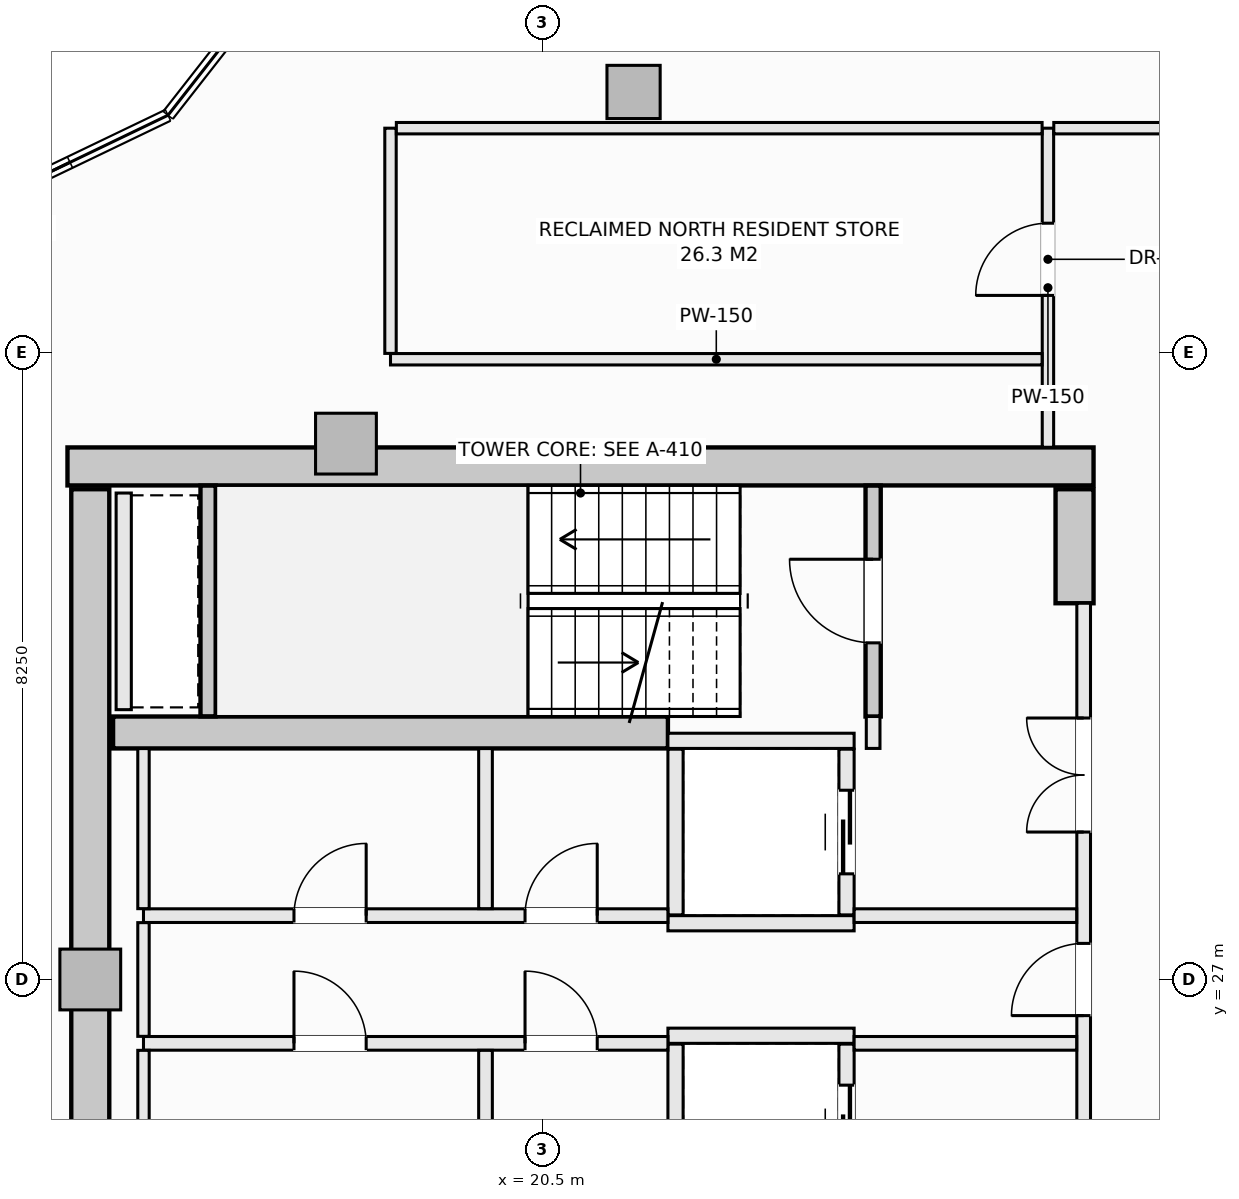
"""IFC4 building model, lengths in metres.
Left out: names, types, materials, properties, quantities, classifications, styles, units other than length and angle.
Written with IfcOpenShell. Run it as: python <this file> out.ifc"""

import sys

from ifc_helpers import new_model, si_unit, direction, frame, frame_2d, origin, origin_2d, place, context, subcontext, project, spatial, rectangle, extrude, element, fill, save


model = new_model("IFC4")
c1 = context("Model", 3, precision=1e-05, world=origin(), true_north=direction((0.0, 1.0)))
c2 = subcontext(c1, "Body", "Model", "MODEL_VIEW")
j1 = project(units=[si_unit("LENGTHUNIT", "METRE"), si_unit("PLANEANGLEUNIT", "RADIAN")], contexts=[c1])
p1 = place(None, origin())
s1 = spatial("IfcSite", under=j1, at=p1, CompositionType="ELEMENT")
p2 = place(p1, origin())
s2 = spatial("IfcBuilding", under=s1, at=p2, CompositionType="ELEMENT")
p3 = place(p2, frame((0.0, 0.0, 252.5)))
s3 = spatial("IfcBuildingStorey", under=s2, at=p3, CompositionType="ELEMENT", Elevation=252.5)
p4 = place(p3, frame((14.25, 33.75, -0.27), z_axis=(0.0, 0.0, 1.0), x_axis=(1.0, 0.0, 0.0)))
e1 = element("IfcWall", 1, at=p4, inside=s3, PredefinedType="SHEAR", context=c2, shape_type="SweptSolid", body=[
    extrude(rectangle(XDim=13.5, YDim=0.5, at=frame_2d((6.75, 0.0))), origin(), (0.0, 0.0, 1.0), 3.3),
])
p5 = place(p3, frame((14.55, 20.55, -0.27), z_axis=(0.0, 0.0, 1.0), x_axis=(0.0, 1.0, 0.0)))
e2 = element("IfcWall", 2, at=p5, inside=s3, PredefinedType="SHEAR", context=c2, shape_type="SweptSolid", body=[
    extrude(rectangle(XDim=12.9, YDim=0.5, at=frame_2d((6.45, 0.0))), origin(), (0.0, 0.0, 1.0), 3.3),
])
p6 = place(p3, frame((27.5, 31.95, -0.27), z_axis=(0.0, 0.0, 1.0), x_axis=(0.0, 1.0, 0.0)))
e3 = element("IfcWall", 3, at=p6, inside=s3, PredefinedType="SHEAR", context=c2, shape_type="SweptSolid", body=[
    extrude(rectangle(XDim=1.5, YDim=0.5, at=frame_2d((0.75, 0.0))), origin(), (0.0, 0.0, 1.0), 3.3),
])
p7 = place(p3, frame((14.85, 30.25, -0.27), z_axis=(0.0, 0.0, 1.0), x_axis=(1.0, 0.0, 0.0)))
e4 = element("IfcWall", 4, at=p7, inside=s3, PredefinedType="SHEAR", context=c2, shape_type="SweptSolid", body=[
    extrude(rectangle(XDim=7.3, YDim=0.42, at=frame_2d((3.65, 0.0))), origin(), (0.0, 0.0, 1.0), 3.3),
])
p8 = place(p3, frame((21.698, 38.677, -0.27), z_axis=(0.0, 0.0, 1.0), x_axis=(1.0, 0.0, 0.0)))
e5 = element("IfcColumn", 5, at=p8, inside=s3, PredefinedType="COLUMN", context=c2, shape_type="SweptSolid", body=[
    extrude(rectangle(XDim=0.7, YDim=0.7, at=origin_2d()), origin(), (0.0, 0.0, 1.0), 3.3),
])
for number, where, z_axis, x_axis in (
    (6, (17.914, 34.05, -0.27), (0.0, 0.0, 1.0), (1.0, 0.0, 0.0)),
    (7, (14.55, 27.0, -0.27), (0.0, 0.0, 1.0), (1.0, 0.0, 0.0)),
):
    element("IfcColumn", number, at=place(p3, frame(where, z_axis=z_axis, x_axis=x_axis)), inside=s3, PredefinedType="PILASTER", context=c2, shape_type="SweptSolid", body=[
        extrude(rectangle(XDim=0.8, YDim=0.8, at=origin_2d()), origin(), (0.0, 0.0, 1.0), 3.3),
    ])
p9 = place(p3, frame((24.85, 30.46, -0.27), z_axis=(0.0, 0.0, 1.0), x_axis=(0.0, 1.0, 0.0)))
e8 = element("IfcWall", 8, at=p9, inside=s3, PredefinedType="SHEAR", context=c2, shape_type="SweptSolid", body=[
    extrude(rectangle(XDim=3.038, YDim=0.2, at=frame_2d((1.519, 0.0))), origin(), (0.0, 0.0, 1.0), 3.3),
])
p10 = place(p9, frame((0.969, 0.0, 0.27)))
e9 = element("IfcOpeningElement", 9, at=p10, cuts=e8, PredefinedType="OPENING", context=c2, shape_type="SweptSolid", body=[
    extrude(rectangle(XDim=1.1, YDim=2.15, at=frame_2d((0.55, 1.075))), frame((0.0, 0.11, 0.0), z_axis=(0.0, -1.0, 0.0), x_axis=(1.0, 0.0, 0.0)), (0.0, 0.0, 1.0), 0.22),
])
p11 = place(p3, frame((16.1, 30.462, -0.27), z_axis=(0.0, 0.0, 1.0), x_axis=(0.0, 1.0, 0.0)))
e10 = element("IfcWall", 10, at=p11, inside=s3, PredefinedType="SHEAR", context=c2, shape_type="SweptSolid", body=[
    extrude(rectangle(XDim=3.036, YDim=0.2, at=frame_2d((1.518, 0.0))), origin(), (0.0, 0.0, 1.0), 3.3),
])
for number, where, z_axis, x_axis in (
    (11, (22.15, 30.14, 0.0), (0.0, 0.0, 1.0), (1.0, 0.0, 0.0)),
    (12, (22.15, 27.74, 0.0), (0.0, 0.0, 1.0), (1.0, 0.0, 0.0)),
):
    element("IfcWall", number, at=place(p3, frame(where, z_axis=z_axis, x_axis=x_axis)), inside=s3, PredefinedType="SOLIDWALL", context=c2, shape_type="SweptSolid", body=[
        extrude(rectangle(XDim=2.45, YDim=0.2, at=frame_2d((1.225, 0.0))), origin(), (0.0, 0.0, 1.0), 3.03),
    ])
p12 = place(p3, frame((22.25, 27.85, 0.0), z_axis=(0.0, 0.0, 1.0), x_axis=(0.0, 1.0, 0.0)))
e13 = element("IfcWall", 13, at=p12, inside=s3, PredefinedType="SOLIDWALL", context=c2, shape_type="SweptSolid", body=[
    extrude(rectangle(XDim=2.18, YDim=0.2, at=frame_2d((1.09, 0.0))), origin(), (0.0, 0.0, 1.0), 3.03),
])
p13 = place(p3, frame((24.5, 27.85, 0.0), z_axis=(0.0, 0.0, 1.0), x_axis=(0.0, 1.0, 0.0)))
e14 = element("IfcWall", 14, at=p13, inside=s3, PredefinedType="SOLIDWALL", context=c2, shape_type="SweptSolid", body=[
    extrude(rectangle(XDim=2.18, YDim=0.2, at=frame_2d((1.09, 0.0))), origin(), (0.0, 0.0, 1.0), 3.03),
])
p14 = place(p13, frame((0.54, 0.0, 0.0)))
e15 = element("IfcOpeningElement", 15, at=p14, cuts=e14, PredefinedType="OPENING", context=c2, shape_type="SweptSolid", body=[
    extrude(rectangle(XDim=1.1, YDim=2.2, at=frame_2d((0.55, 1.1))), frame((0.0, 0.11, 0.0), z_axis=(0.0, -1.0, 0.0), x_axis=(1.0, 0.0, 0.0)), (0.0, 0.0, 1.0), 0.22),
])
p15 = place(p3, frame((22.15, 26.26, 0.0), z_axis=(0.0, 0.0, 1.0), x_axis=(1.0, 0.0, 0.0)))
e16 = element("IfcWall", 16, at=p15, inside=s3, PredefinedType="SOLIDWALL", context=c2, shape_type="SweptSolid", body=[
    extrude(rectangle(XDim=2.45, YDim=0.2, at=frame_2d((1.225, 0.0))), origin(), (0.0, 0.0, 1.0), 3.03),
])
p16 = place(p3, frame((22.25, 23.97, 0.0), z_axis=(0.0, 0.0, 1.0), x_axis=(0.0, 1.0, 0.0)))
e17 = element("IfcWall", 17, at=p16, inside=s3, PredefinedType="SOLIDWALL", context=c2, shape_type="SweptSolid", body=[
    extrude(rectangle(XDim=2.18, YDim=0.2, at=frame_2d((1.09, 0.0))), origin(), (0.0, 0.0, 1.0), 3.03),
])
p17 = place(p3, frame((24.5, 23.97, 0.0), z_axis=(0.0, 0.0, 1.0), x_axis=(0.0, 1.0, 0.0)))
e18 = element("IfcWall", 18, at=p17, inside=s3, PredefinedType="SOLIDWALL", context=c2, shape_type="SweptSolid", body=[
    extrude(rectangle(XDim=2.18, YDim=0.2, at=frame_2d((1.09, 0.0))), origin(), (0.0, 0.0, 1.0), 3.03),
])
p18 = place(p17, frame((0.54, 0.0, 0.0)))
e19 = element("IfcOpeningElement", 19, at=p18, cuts=e18, PredefinedType="OPENING", context=c2, shape_type="SweptSolid", body=[
    extrude(rectangle(XDim=1.1, YDim=2.2, at=frame_2d((0.55, 1.1))), frame((0.0, 0.11, 0.0), z_axis=(0.0, -1.0, 0.0), x_axis=(1.0, 0.0, 0.0)), (0.0, 0.0, 1.0), 0.22),
])
p19 = place(p3, frame((14.99, 30.55, 0.0), z_axis=(0.0, 0.0, 1.0), x_axis=(0.0, 1.0, 0.0)))
e20 = element("IfcWall", 20, at=p19, inside=s3, PredefinedType="SOLIDWALL", context=c2, shape_type="SweptSolid", body=[
    extrude(rectangle(XDim=2.85, YDim=0.2, at=frame_2d((1.425, 0.0))), origin(), (0.0, 0.0, 1.0), 3.03),
])
p20 = place(p3, frame((24.85, 30.04, 0.0), z_axis=(0.0, 0.0, 1.0), x_axis=(0.0, 1.0, 0.0)))
e21 = element("IfcWall", 21, at=p20, inside=s3, PredefinedType="SOLIDWALL", context=c2, shape_type="SweptSolid", body=[
    extrude(rectangle(XDim=0.42, YDim=0.18, at=frame_2d((0.21, 0.0))), origin(), (0.0, 0.0, 1.0), 3.03),
])
p21 = place(p3, frame((27.62, 22.05, 0.0), z_axis=(0.0, 0.0, 1.0), x_axis=(0.0, 1.0, 0.0)))
e22 = element("IfcWall", 22, at=p21, inside=s3, PredefinedType="SOLIDWALL", context=c2, shape_type="SweptSolid", body=[
    extrude(rectangle(XDim=9.9, YDim=0.18, at=frame_2d((4.95, 0.0))), origin(), (0.0, 0.0, 1.0), 3.03),
])
p22 = place(p21, frame((4.475, 0.0, 0.0)))
e23 = element("IfcOpeningElement", 23, at=p22, cuts=e22, PredefinedType="OPENING", context=c2, shape_type="SweptSolid", body=[
    extrude(rectangle(XDim=0.95, YDim=2.1, at=frame_2d((0.475, 1.05))), frame((0.0, 0.1, 0.0), z_axis=(0.0, -1.0, 0.0), x_axis=(1.0, 0.0, 0.0)), (0.0, 0.0, 1.0), 0.2),
])
p23 = place(p21, frame((6.89, 0.0, 0.0)))
e24 = element("IfcOpeningElement", 24, at=p23, cuts=e22, PredefinedType="OPENING", context=c2, shape_type="SweptSolid", body=[
    extrude(rectangle(XDim=1.5, YDim=2.2, at=frame_2d((0.75, 1.1))), frame((0.0, 0.1, 0.0), z_axis=(0.0, -1.0, 0.0), x_axis=(1.0, 0.0, 0.0)), (0.0, 0.0, 1.0), 0.2),
])
p24 = place(p21, frame((1.51, 0.0, 0.0)))
e25 = element("IfcOpeningElement", 25, at=p24, cuts=e22, PredefinedType="OPENING", context=c2, shape_type="SweptSolid", body=[
    extrude(rectangle(XDim=1.5, YDim=2.2, at=frame_2d((0.75, 1.1))), frame((0.0, 0.1, 0.0), z_axis=(0.0, -1.0, 0.0), x_axis=(1.0, 0.0, 0.0)), (0.0, 0.0, 1.0), 0.2),
])
p25 = place(p3, frame((15.25, 27.84, 0.0), z_axis=(0.0, 0.0, 1.0), x_axis=(1.0, 0.0, 0.0)))
e26 = element("IfcWall", 26, at=p25, inside=s3, PredefinedType="SOLIDWALL", context=c2, shape_type="SweptSolid", body=[
    extrude(rectangle(XDim=6.9, YDim=0.18, at=frame_2d((3.45, 0.0))), origin(), (0.0, 0.0, 1.0), 3.03),
])
p26 = place(p25, frame((5.02, 0.0, 0.0)))
e27 = element("IfcOpeningElement", 27, at=p26, cuts=e26, PredefinedType="OPENING", context=c2, shape_type="SweptSolid", body=[
    extrude(rectangle(XDim=0.95, YDim=2.1, at=frame_2d((0.475, 1.05))), frame((0.0, 0.1, 0.0), z_axis=(0.0, -1.0, 0.0), x_axis=(1.0, 0.0, 0.0)), (0.0, 0.0, 1.0), 0.2),
])
p27 = place(p25, frame((1.98, 0.0, 0.0)))
e28 = element("IfcOpeningElement", 28, at=p27, cuts=e26, PredefinedType="OPENING", context=c2, shape_type="SweptSolid", body=[
    extrude(rectangle(XDim=0.95, YDim=2.1, at=frame_2d((0.475, 1.05))), frame((0.0, 0.1, 0.0), z_axis=(0.0, -1.0, 0.0), x_axis=(1.0, 0.0, 0.0)), (0.0, 0.0, 1.0), 0.2),
])
p28 = place(p3, frame((24.6, 27.84, 0.0), z_axis=(0.0, 0.0, 1.0), x_axis=(1.0, 0.0, 0.0)))
e29 = element("IfcWall", 29, at=p28, inside=s3, PredefinedType="SOLIDWALL", context=c2, shape_type="SweptSolid", body=[
    extrude(rectangle(XDim=2.928, YDim=0.18, at=frame_2d((1.464, 0.0))), origin(), (0.0, 0.0, 1.0), 3.03),
])
p29 = place(p3, frame((15.25, 26.16, 0.0), z_axis=(0.0, 0.0, 1.0), x_axis=(1.0, 0.0, 0.0)))
e30 = element("IfcWall", 30, at=p29, inside=s3, PredefinedType="SOLIDWALL", context=c2, shape_type="SweptSolid", body=[
    extrude(rectangle(XDim=6.9, YDim=0.18, at=frame_2d((3.45, 0.0))), origin(), (0.0, 0.0, 1.0), 3.03),
])
p30 = place(p29, frame((5.02, 0.0, 0.0)))
e31 = element("IfcOpeningElement", 31, at=p30, cuts=e30, PredefinedType="OPENING", context=c2, shape_type="SweptSolid", body=[
    extrude(rectangle(XDim=0.95, YDim=2.1, at=frame_2d((0.475, 1.05))), frame((0.0, 0.1, 0.0), z_axis=(0.0, -1.0, 0.0), x_axis=(1.0, 0.0, 0.0)), (0.0, 0.0, 1.0), 0.2),
])
p31 = place(p29, frame((1.98, 0.0, 0.0)))
e32 = element("IfcOpeningElement", 32, at=p31, cuts=e30, PredefinedType="OPENING", context=c2, shape_type="SweptSolid", body=[
    extrude(rectangle(XDim=0.95, YDim=2.1, at=frame_2d((0.475, 1.05))), frame((0.0, 0.1, 0.0), z_axis=(0.0, -1.0, 0.0), x_axis=(1.0, 0.0, 0.0)), (0.0, 0.0, 1.0), 0.2),
])
p32 = place(p3, frame((24.6, 26.16, 0.0), z_axis=(0.0, 0.0, 1.0), x_axis=(1.0, 0.0, 0.0)))
e33 = element("IfcWall", 33, at=p32, inside=s3, PredefinedType="SOLIDWALL", context=c2, shape_type="SweptSolid", body=[
    extrude(rectangle(XDim=2.928, YDim=0.18, at=frame_2d((1.464, 0.0))), origin(), (0.0, 0.0, 1.0), 3.03),
])
p33 = place(p3, frame((15.25, 23.962, 0.0), z_axis=(0.0, 0.0, 1.0), x_axis=(0.0, 1.0, 0.0)))
e34 = element("IfcWall", 34, at=p33, inside=s3, PredefinedType="PARTITIONING", context=c2, shape_type="SweptSolid", body=[
    extrude(rectangle(XDim=2.106, YDim=0.15, at=frame_2d((1.053, 0.0))), origin(), (0.0, 0.0, 1.0), 3.03),
])
p34 = place(p3, frame((15.25, 26.252, 0.0), z_axis=(0.0, 0.0, 1.0), x_axis=(0.0, 1.0, 0.0)))
e35 = element("IfcWall", 35, at=p34, inside=s3, PredefinedType="PARTITIONING", context=c2, shape_type="SweptSolid", body=[
    extrude(rectangle(XDim=1.496, YDim=0.15, at=frame_2d((0.748, 0.0))), origin(), (0.0, 0.0, 1.0), 3.03),
])
p35 = place(p3, frame((15.25, 27.932, 0.0), z_axis=(0.0, 0.0, 1.0), x_axis=(0.0, 1.0, 0.0)))
e36 = element("IfcWall", 36, at=p35, inside=s3, PredefinedType="PARTITIONING", context=c2, shape_type="SweptSolid", body=[
    extrude(rectangle(XDim=2.106, YDim=0.15, at=frame_2d((1.053, 0.0))), origin(), (0.0, 0.0, 1.0), 3.03),
])
for number, where, z_axis, x_axis in (
    (37, (19.75, 23.962, 0.0), (0.0, 0.0, 1.0), (0.0, 1.0, 0.0)),
    (38, (19.75, 27.932, 0.0), (0.0, 0.0, 1.0), (0.0, 1.0, 0.0)),
):
    element("IfcWall", number, at=place(p3, frame(where, z_axis=z_axis, x_axis=x_axis)), inside=s3, PredefinedType="SOLIDWALL", context=c2, shape_type="SweptSolid", body=[
        extrude(rectangle(XDim=2.106, YDim=0.18, at=frame_2d((1.053, 0.0))), origin(), (0.0, 0.0, 1.0), 3.03),
    ])
p36 = place(p3, frame((27.15, 34.002, 0.0), z_axis=(0.0, 0.0, 1.0), x_axis=(0.0, 1.0, 0.0)))
e39 = element("IfcWall", 39, at=p36, inside=s3, PredefinedType="PARTITIONING", context=c2, shape_type="SweptSolid", body=[
    extrude(rectangle(XDim=4.198, YDim=0.15, at=frame_2d((2.099, 0.0))), origin(), (0.0, 0.0, 1.0), 3.03),
])
p37 = place(p36, frame((1.998, 0.0, 0.0)))
e40 = element("IfcOpeningElement", 40, at=p37, cuts=e39, PredefinedType="OPENING", context=c2, shape_type="SweptSolid", body=[
    extrude(rectangle(XDim=0.95, YDim=2.1, at=frame_2d((0.475, 1.05))), frame((0.0, 0.085, 0.0), z_axis=(0.0, -1.0, 0.0), x_axis=(1.0, 0.0, 0.0)), (0.0, 0.0, 1.0), 0.17),
])
p38 = place(p3, frame((18.5, 35.16, 0.0), z_axis=(0.0, 0.0, 1.0), x_axis=(1.0, 0.0, 0.0)))
e41 = element("IfcWall", 41, at=p38, inside=s3, PredefinedType="PARTITIONING", context=c2, shape_type="SweptSolid", body=[
    extrude(rectangle(XDim=8.573, YDim=0.15, at=frame_2d((4.287, 0.0))), origin(), (0.0, 0.0, 1.0), 3.03),
])
p39 = place(p3, frame((18.5, 35.237, 0.0), z_axis=(0.0, 0.0, 1.0), x_axis=(0.0, 1.0, 0.0)))
e42 = element("IfcWall", 42, at=p39, inside=s3, PredefinedType="PARTITIONING", context=c2, shape_type="SweptSolid", body=[
    extrude(rectangle(XDim=2.963, YDim=0.15, at=frame_2d((1.481, 0.0))), origin(), (0.0, 0.0, 1.0), 3.03),
])
p40 = place(p3, frame((18.577, 38.2, 0.0), z_axis=(0.0, 0.0, 1.0), x_axis=(1.0, 0.0, 0.0)))
e43 = element("IfcWall", 43, at=p40, inside=s3, PredefinedType="PARTITIONING", context=c2, shape_type="SweptSolid", body=[
    extrude(rectangle(XDim=8.496, YDim=0.15, at=frame_2d((4.248, 0.0))), origin(), (0.0, 0.0, 1.0), 3.03),
])
p41 = place(p3, frame((27.227, 38.2, 0.0), z_axis=(0.0, 0.0, 1.0), x_axis=(1.0, 0.0, 0.0)))
e44 = element("IfcWall", 44, at=p41, inside=s3, PredefinedType="PARTITIONING", context=c2, shape_type="SweptSolid", body=[
    extrude(rectangle(XDim=2.711, YDim=0.15, at=frame_2d((1.355, 0.0))), origin(), (0.0, 0.0, 1.0), 3.03),
])
p42 = place(p3, frame((24.302, 44.227, 0.0), z_axis=(0.0, 0.0, 1.0), x_axis=(0.813249507018, -0.581915147883, 0.0)))
e45 = element("IfcWall", 45, at=p42, inside=s3, PredefinedType="PARTITIONING", context=c2, shape_type="SweptSolid", body=[
    extrude(rectangle(XDim=14.46, YDim=0.12, at=frame_2d((7.23, 0.0))), origin(), (0.0, 0.0, 1.0), 2.478),
])
p43 = place(p10, origin())
e46 = element("IfcDoor", 46, at=p43, inside=s3, OperationType="SINGLE_SWING_RIGHT", PredefinedType="DOOR", context=c2, shape_type="SweptSolid", body=[
    extrude(rectangle(XDim=1.1, YDim=2.15, at=frame_2d((0.55, 1.075))), frame((0.0, 0.025, 0.0), z_axis=(0.0, -1.0, 0.0), x_axis=(1.0, 0.0, 0.0)), (0.0, 0.0, 1.0), 0.05),
])
fill(e9, e46)
p44 = place(p14, origin())
e47 = element("IfcDoor", 47, at=p44, inside=s3, OperationType="SLIDING_TO_LEFT", PredefinedType="DOOR", context=c2, shape_type="SweptSolid", body=[
    extrude(rectangle(XDim=1.1, YDim=2.2, at=frame_2d((0.55, 1.1))), frame((0.0, 0.025, 0.0), z_axis=(0.0, -1.0, 0.0), x_axis=(1.0, 0.0, 0.0)), (0.0, 0.0, 1.0), 0.05),
])
fill(e15, e47)
p45 = place(p18, origin())
e48 = element("IfcDoor", 48, at=p45, inside=s3, OperationType="SLIDING_TO_LEFT", PredefinedType="DOOR", context=c2, shape_type="SweptSolid", body=[
    extrude(rectangle(XDim=1.1, YDim=2.2, at=frame_2d((0.55, 1.1))), frame((0.0, 0.025, 0.0), z_axis=(0.0, -1.0, 0.0), x_axis=(1.0, 0.0, 0.0)), (0.0, 0.0, 1.0), 0.05),
])
fill(e19, e48)
p46 = place(p22, origin())
e49 = element("IfcDoor", 49, at=p46, inside=s3, OperationType="SINGLE_SWING_LEFT", PredefinedType="DOOR", context=c2, shape_type="SweptSolid", body=[
    extrude(rectangle(XDim=0.95, YDim=2.1, at=frame_2d((0.475, 1.05))), frame((0.0, 0.025, 0.0), z_axis=(0.0, -1.0, 0.0), x_axis=(1.0, 0.0, 0.0)), (0.0, 0.0, 1.0), 0.05),
])
fill(e23, e49)
p47 = place(p23, origin())
e50 = element("IfcDoor", 50, at=p47, inside=s3, OperationType="DOUBLE_DOOR_SINGLE_SWING", PredefinedType="DOOR", context=c2, shape_type="SweptSolid", body=[
    extrude(rectangle(XDim=1.5, YDim=2.2, at=frame_2d((0.75, 1.1))), frame((0.0, 0.025, 0.0), z_axis=(0.0, -1.0, 0.0), x_axis=(1.0, 0.0, 0.0)), (0.0, 0.0, 1.0), 0.05),
])
fill(e24, e50)
p48 = place(p26, origin())
e51 = element("IfcDoor", 51, at=p48, inside=s3, OperationType="SINGLE_SWING_RIGHT", PredefinedType="DOOR", context=c2, shape_type="SweptSolid", body=[
    extrude(rectangle(XDim=0.95, YDim=2.1, at=frame_2d((0.475, 1.05))), frame((0.0, 0.025, 0.0), z_axis=(0.0, -1.0, 0.0), x_axis=(1.0, 0.0, 0.0)), (0.0, 0.0, 1.0), 0.05),
])
fill(e27, e51)
p49 = place(p30, origin())
e52 = element("IfcDoor", 52, at=p49, inside=s3, OperationType="SINGLE_SWING_LEFT", PredefinedType="DOOR", context=c2, shape_type="SweptSolid", body=[
    extrude(rectangle(XDim=0.95, YDim=2.1, at=frame_2d((0.475, 1.05))), frame((0.0, 0.025, 0.0), z_axis=(0.0, -1.0, 0.0), x_axis=(1.0, 0.0, 0.0)), (0.0, 0.0, 1.0), 0.05),
])
fill(e31, e52)
p50 = place(p27, origin())
e53 = element("IfcDoor", 53, at=p50, inside=s3, OperationType="SINGLE_SWING_RIGHT", PredefinedType="DOOR", context=c2, shape_type="SweptSolid", body=[
    extrude(rectangle(XDim=0.95, YDim=2.1, at=frame_2d((0.475, 1.05))), frame((0.0, 0.025, 0.0), z_axis=(0.0, -1.0, 0.0), x_axis=(1.0, 0.0, 0.0)), (0.0, 0.0, 1.0), 0.05),
])
fill(e28, e53)
p51 = place(p31, origin())
e54 = element("IfcDoor", 54, at=p51, inside=s3, OperationType="SINGLE_SWING_LEFT", PredefinedType="DOOR", context=c2, shape_type="SweptSolid", body=[
    extrude(rectangle(XDim=0.95, YDim=2.1, at=frame_2d((0.475, 1.05))), frame((0.0, 0.025, 0.0), z_axis=(0.0, -1.0, 0.0), x_axis=(1.0, 0.0, 0.0)), (0.0, 0.0, 1.0), 0.05),
])
fill(e32, e54)
p52 = place(p37, origin())
e55 = element("IfcDoor", 55, at=p52, inside=s3, OperationType="SINGLE_SWING_LEFT", PredefinedType="DOOR", context=c2, shape_type="SweptSolid", body=[
    extrude(rectangle(XDim=0.95, YDim=2.1, at=frame_2d((0.475, 1.05))), frame((0.0, 0.025, 0.0), z_axis=(0.0, -1.0, 0.0), x_axis=(1.0, 0.0, 0.0)), (0.0, 0.0, 1.0), 0.05),
])
fill(e40, e55)
save(model, sys.argv[1])
